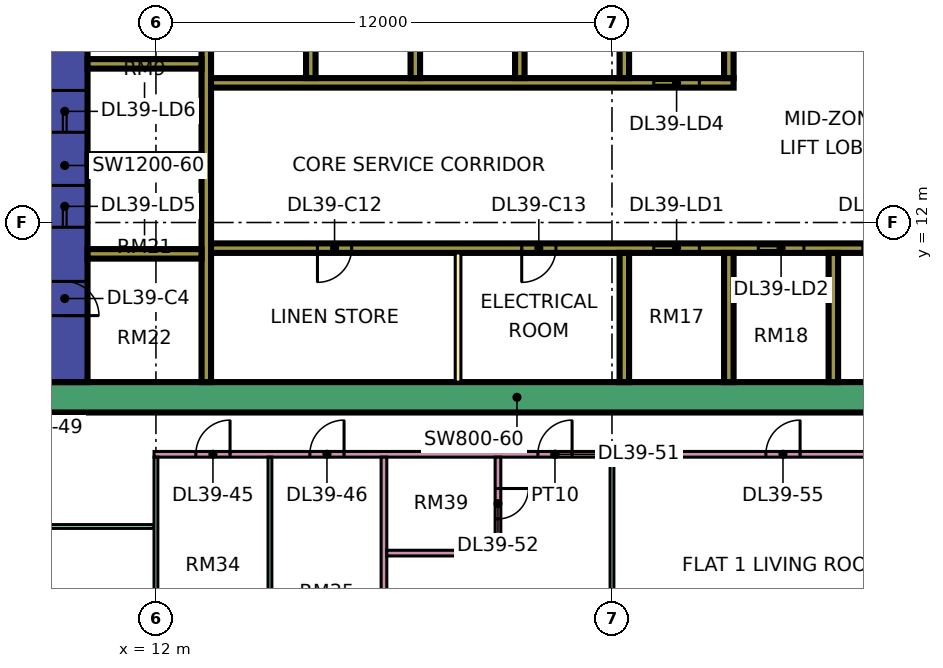
"""IFC4 building model, lengths in metres.
Left out: names, types, materials, properties, quantities, classifications, styles, units other than length and angle.
Written with IfcOpenShell. Run it as: python <this file> out.ifc"""

import sys

from ifc_helpers import new_model, si_unit, direction, frame, frame_2d, origin, place, context, subcontext, project, spatial, rectangle, extrude, element, fill, save


model = new_model("IFC4")
c1 = context("Model", 3, precision=1e-05, world=origin(), true_north=direction((0.0, 1.0)))
c2 = subcontext(c1, "Body", "Model", "MODEL_VIEW")
j1 = project(units=[si_unit("LENGTHUNIT", "METRE"), si_unit("PLANEANGLEUNIT", "RADIAN")], contexts=[c1])
p1 = place(None, origin())
s1 = spatial("IfcSite", under=j1, at=p1, CompositionType="ELEMENT")
p2 = place(p1, origin())
s2 = spatial("IfcBuilding", under=s1, at=p2, CompositionType="ELEMENT")
p3 = place(p2, frame((0.0, 0.0, 172.4)))
s3 = spatial("IfcBuildingStorey", under=s2, at=p3, CompositionType="ELEMENT", Elevation=172.4)
p4 = place(p3, frame((9.0, 7.4, 0.0), z_axis=(0.0, 0.0, 1.0), x_axis=(1.0, 0.0, 0.0)))
e1 = element("IfcWall", 1, at=p4, inside=s3, PredefinedType="SHEAR", context=c2, shape_type="SweptSolid", body=[
    extrude(rectangle(XDim=25.0, YDim=0.8, at=frame_2d((12.5, 0.0))), origin(), (0.0, 0.0, 1.0), 3.75),
])
p5 = place(p3, frame((9.6, 7.8, 0.0), z_axis=(0.0, 0.0, 1.0), x_axis=(0.0, 1.0, 0.0)))
e2 = element("IfcWall", 2, at=p5, inside=s3, PredefinedType="SHEAR", context=c2, shape_type="SweptSolid", body=[
    extrude(rectangle(XDim=11.4, YDim=1.2, at=frame_2d((5.7, 0.0))), origin(), (0.0, 0.0, 1.0), 3.75),
])
p6 = place(p5, frame((4.075, 0.0, 0.0)))
e3 = element("IfcOpeningElement", 3, at=p6, cuts=e2, PredefinedType="OPENING", context=c2, shape_type="SweptSolid", body=[
    extrude(rectangle(XDim=1.1, YDim=2.2, at=frame_2d((0.55, 1.1))), frame((0.0, 0.61, 0.0), z_axis=(0.0, -1.0, 0.0), x_axis=(1.0, 0.0, 0.0)), (0.0, 0.0, 1.0), 1.22),
])
p7 = place(p5, frame((6.575, 0.0, 0.0)))
e4 = element("IfcOpeningElement", 4, at=p7, cuts=e2, PredefinedType="OPENING", context=c2, shape_type="SweptSolid", body=[
    extrude(rectangle(XDim=1.1, YDim=2.2, at=frame_2d((0.55, 1.1))), frame((0.0, 0.61, 0.0), z_axis=(0.0, -1.0, 0.0), x_axis=(1.0, 0.0, 0.0)), (0.0, 0.0, 1.0), 1.22),
])
p8 = place(p5, frame((9.4, 0.0, 0.0)))
e5 = element("IfcOpeningElement", 5, at=p8, cuts=e2, PredefinedType="OPENING", context=c2, shape_type="SweptSolid", body=[
    extrude(rectangle(XDim=1.1, YDim=2.2, at=frame_2d((0.55, 1.1))), frame((0.0, 0.61, 0.0), z_axis=(0.0, -1.0, 0.0), x_axis=(1.0, 0.0, 0.0)), (0.0, 0.0, 1.0), 1.22),
])
p9 = place(p5, frame((1.75, 0.0, 0.0)))
e6 = element("IfcOpeningElement", 6, at=p9, cuts=e2, PredefinedType="OPENING", context=c2, shape_type="SweptSolid", body=[
    extrude(rectangle(XDim=0.9, YDim=2.1, at=frame_2d((0.45, 1.05))), frame((0.0, 0.61, 0.0), z_axis=(0.0, -1.0, 0.0), x_axis=(1.0, 0.0, 0.0)), (0.0, 0.0, 1.0), 1.22),
])
p10 = place(p3, frame((13.325, 7.8, 0.0), z_axis=(0.0, 0.0, 1.0), x_axis=(0.0, 1.0, 0.0)))
e7 = element("IfcWall", 7, at=p10, inside=s3, PredefinedType="SHEAR", context=c2, shape_type="SweptSolid", body=[
    extrude(rectangle(XDim=11.4, YDim=0.25, at=frame_2d((5.7, 0.0))), origin(), (0.0, 0.0, 1.0), 3.75),
])
p11 = place(p3, frame((13.45, 11.325, 0.0), z_axis=(0.0, 0.0, 1.0), x_axis=(1.0, 0.0, 0.0)))
e8 = element("IfcWall", 8, at=p11, inside=s3, PredefinedType="SHEAR", context=c2, shape_type="SweptSolid", body=[
    extrude(rectangle(XDim=19.75, YDim=0.25, at=frame_2d((9.875, 0.0))), origin(), (0.0, 0.0, 1.0), 3.75),
])
p12 = place(p11, frame((11.65, 0.0, 0.0)))
e9 = element("IfcOpeningElement", 9, at=p12, cuts=e8, PredefinedType="OPENING", context=c2, shape_type="SweptSolid", body=[
    extrude(rectangle(XDim=1.2, YDim=2.2, at=frame_2d((0.6, 1.1))), frame((0.0, 0.135, 0.0), z_axis=(0.0, -1.0, 0.0), x_axis=(1.0, 0.0, 0.0)), (0.0, 0.0, 1.0), 0.27),
])
p13 = place(p11, frame((14.4, 0.0, 0.0)))
e10 = element("IfcOpeningElement", 10, at=p13, cuts=e8, PredefinedType="OPENING", context=c2, shape_type="SweptSolid", body=[
    extrude(rectangle(XDim=1.2, YDim=2.2, at=frame_2d((0.6, 1.1))), frame((0.0, 0.135, 0.0), z_axis=(0.0, -1.0, 0.0), x_axis=(1.0, 0.0, 0.0)), (0.0, 0.0, 1.0), 0.27),
])
p14 = place(p11, frame((17.15, 0.0, 0.0)))
e11 = element("IfcOpeningElement", 11, at=p14, cuts=e8, PredefinedType="OPENING", context=c2, shape_type="SweptSolid", body=[
    extrude(rectangle(XDim=1.2, YDim=2.2, at=frame_2d((0.6, 1.1))), frame((0.0, 0.135, 0.0), z_axis=(0.0, -1.0, 0.0), x_axis=(1.0, 0.0, 0.0)), (0.0, 0.0, 1.0), 0.27),
])
p15 = place(p11, frame((2.8, 0.0, 0.0)))
e12 = element("IfcOpeningElement", 12, at=p15, cuts=e8, PredefinedType="OPENING", context=c2, shape_type="SweptSolid", body=[
    extrude(rectangle(XDim=0.9, YDim=2.1, at=frame_2d((0.45, 1.05))), frame((0.0, 0.135, 0.0), z_axis=(0.0, -1.0, 0.0), x_axis=(1.0, 0.0, 0.0)), (0.0, 0.0, 1.0), 0.27),
])
p16 = place(p11, frame((8.175, 0.0, 0.0)))
e13 = element("IfcOpeningElement", 13, at=p16, cuts=e8, PredefinedType="OPENING", context=c2, shape_type="SweptSolid", body=[
    extrude(rectangle(XDim=0.9, YDim=2.1, at=frame_2d((0.45, 1.05))), frame((0.0, 0.135, 0.0), z_axis=(0.0, -1.0, 0.0), x_axis=(1.0, 0.0, 0.0)), (0.0, 0.0, 1.0), 0.27),
])
p17 = place(p3, frame((13.45, 15.675, 0.0), z_axis=(0.0, 0.0, 1.0), x_axis=(1.0, 0.0, 0.0)))
e14 = element("IfcWall", 14, at=p17, inside=s3, PredefinedType="SHEAR", context=c2, shape_type="SweptSolid", body=[
    extrude(rectangle(XDim=13.75, YDim=0.25, at=frame_2d((6.875, 0.0))), origin(), (0.0, 0.0, 1.0), 3.75),
])
p18 = place(p17, frame((11.65, 0.0, 0.0)))
e15 = element("IfcOpeningElement", 15, at=p18, cuts=e14, PredefinedType="OPENING", context=c2, shape_type="SweptSolid", body=[
    extrude(rectangle(XDim=1.2, YDim=2.2, at=frame_2d((0.6, 1.1))), frame((0.0, 0.135, 0.0), z_axis=(0.0, -1.0, 0.0), x_axis=(1.0, 0.0, 0.0)), (0.0, 0.0, 1.0), 0.27),
])
for number, where, z_axis, x_axis in (
    (16, (10.2, 11.175, 0.0), (0.0, 0.0, 1.0), (1.0, 0.0, 0.0)),
    (17, (10.2, 13.675, 0.0), (0.0, 0.0, 1.0), (1.0, 0.0, 0.0)),
    (18, (10.2, 16.175, 0.0), (0.0, 0.0, 1.0), (1.0, 0.0, 0.0)),
):
    element("IfcWall", number, at=place(p3, frame(where, z_axis=z_axis, x_axis=x_axis)), inside=s3, PredefinedType="SHEAR", context=c2, shape_type="SweptSolid", body=[
        extrude(rectangle(XDim=3.0, YDim=0.25, at=frame_2d((1.5, 0.0))), origin(), (0.0, 0.0, 1.0), 3.75),
    ])
for number, where, z_axis, x_axis in (
    (19, (24.325, 7.8, 0.0), (0.0, 0.0, 1.0), (0.0, 1.0, 0.0)),
    (20, (27.075, 7.8, 0.0), (0.0, 0.0, 1.0), (0.0, 1.0, 0.0)),
    (21, (29.825, 7.8, 0.0), (0.0, 0.0, 1.0), (0.0, 1.0, 0.0)),
    (22, (16.075, 15.8, 0.0), (0.0, 0.0, 1.0), (0.0, 1.0, 0.0)),
    (23, (18.825, 15.8, 0.0), (0.0, 0.0, 1.0), (0.0, 1.0, 0.0)),
    (24, (21.575, 15.8, 0.0), (0.0, 0.0, 1.0), (0.0, 1.0, 0.0)),
    (25, (24.325, 15.8, 0.0), (0.0, 0.0, 1.0), (0.0, 1.0, 0.0)),
    (26, (27.075, 15.8, 0.0), (0.0, 0.0, 1.0), (0.0, 1.0, 0.0)),
):
    element("IfcWall", number, at=place(p3, frame(where, z_axis=z_axis, x_axis=x_axis)), inside=s3, PredefinedType="SHEAR", context=c2, shape_type="SweptSolid", body=[
        extrude(rectangle(XDim=3.4, YDim=0.25, at=frame_2d((1.7, 0.0))), origin(), (0.0, 0.0, 1.0), 3.75),
    ])
p19 = place(p3, frame((-1.447, 12.553, 0.0), z_axis=(0.0, 0.0, 1.0), x_axis=(0.707106781187, -0.707106781187, 0.0)))
e27 = element("IfcWall", 27, at=p19, inside=s3, PredefinedType="SOLIDWALL", context=c2, shape_type="SweptSolid", body=[
    extrude(rectangle(XDim=19.799, YDim=0.15, at=frame_2d((9.899, 0.0))), origin(), (0.0, 0.0, 1.0), 3.35),
])
p20 = place(p19, frame((2.212, 0.0, 0.45)))
e28 = element("IfcOpeningElement", 28, at=p20, cuts=e27, PredefinedType="OPENING", context=c2, shape_type="SweptSolid", body=[
    extrude(rectangle(XDim=3.0, YDim=2.4, at=frame_2d((1.5, 1.2))), frame((0.0, 0.085, 0.0), z_axis=(0.0, -1.0, 0.0), x_axis=(1.0, 0.0, 0.0)), (0.0, 0.0, 1.0), 0.17),
])
p21 = place(p19, frame((10.216, 0.0, 0.45)))
e29 = element("IfcOpeningElement", 29, at=p21, cuts=e27, PredefinedType="OPENING", context=c2, shape_type="SweptSolid", body=[
    extrude(rectangle(XDim=3.0, YDim=2.4, at=frame_2d((1.5, 1.2))), frame((0.0, 0.085, 0.0), z_axis=(0.0, -1.0, 0.0), x_axis=(1.0, 0.0, 0.0)), (0.0, 0.0, 1.0), 0.17),
])
p22 = place(p3, frame((19.95, 7.8, 0.0), z_axis=(0.0, 0.0, 1.0), x_axis=(0.0, 1.0, 0.0)))
e30 = element("IfcWall", 30, at=p22, inside=s3, PredefinedType="PARTITIONING", context=c2, shape_type="SweptSolid", body=[
    extrude(rectangle(XDim=3.4, YDim=0.15, at=frame_2d((1.7, 0.0))), origin(), (0.0, 0.0, 1.0), 3.35),
])
p23 = place(p3, frame((9.05, 4.0, 0.0), z_axis=(0.0, 0.0, 1.0), x_axis=(1.0, 0.0, 0.0)))
e31 = element("IfcWall", 31, at=p23, inside=s3, PredefinedType="PARTITIONING", context=c2, shape_type="SweptSolid", body=[
    extrude(rectangle(XDim=2.9, YDim=0.1, at=frame_2d((1.45, 0.0))), origin(), (0.0, 0.0, 1.0), 3.35),
])
p24 = place(p3, frame((11.95, 5.9, 0.0), z_axis=(0.0, 0.0, 1.0), x_axis=(1.0, 0.0, 0.0)))
e32 = element("IfcWall", 32, at=p24, inside=s3, PredefinedType="PARTITIONING", context=c2, shape_type="SweptSolid", body=[
    extrude(rectangle(XDim=21.1, YDim=0.15, at=frame_2d((10.55, 0.0))), origin(), (0.0, 0.0, 1.0), 3.35),
])
p25 = place(p24, frame((1.1, 0.0, 0.0)))
e33 = element("IfcOpeningElement", 33, at=p25, cuts=e32, PredefinedType="OPENING", context=c2, shape_type="SweptSolid", body=[
    extrude(rectangle(XDim=0.9, YDim=2.1, at=frame_2d((0.45, 1.05))), frame((0.0, 0.085, 0.0), z_axis=(0.0, -1.0, 0.0), x_axis=(1.0, 0.0, 0.0)), (0.0, 0.0, 1.0), 0.17),
])
p26 = place(p24, frame((4.1, 0.0, 0.0)))
e34 = element("IfcOpeningElement", 34, at=p26, cuts=e32, PredefinedType="OPENING", context=c2, shape_type="SweptSolid", body=[
    extrude(rectangle(XDim=0.9, YDim=2.1, at=frame_2d((0.45, 1.05))), frame((0.0, 0.085, 0.0), z_axis=(0.0, -1.0, 0.0), x_axis=(1.0, 0.0, 0.0)), (0.0, 0.0, 1.0), 0.17),
])
p27 = place(p24, frame((10.1, 0.0, 0.0)))
e35 = element("IfcOpeningElement", 35, at=p27, cuts=e32, PredefinedType="OPENING", context=c2, shape_type="SweptSolid", body=[
    extrude(rectangle(XDim=0.9, YDim=2.1, at=frame_2d((0.45, 1.05))), frame((0.0, 0.085, 0.0), z_axis=(0.0, -1.0, 0.0), x_axis=(1.0, 0.0, 0.0)), (0.0, 0.0, 1.0), 0.17),
])
p28 = place(p24, frame((16.1, 0.0, 0.0)))
e36 = element("IfcOpeningElement", 36, at=p28, cuts=e32, PredefinedType="OPENING", context=c2, shape_type="SweptSolid", body=[
    extrude(rectangle(XDim=0.9, YDim=2.1, at=frame_2d((0.45, 1.05))), frame((0.0, 0.085, 0.0), z_axis=(0.0, -1.0, 0.0), x_axis=(1.0, 0.0, 0.0)), (0.0, 0.0, 1.0), 0.17),
])
p29 = place(p3, frame((12.0, -0.788, 0.0), z_axis=(0.0, 0.0, 1.0), x_axis=(0.0, 1.0, 0.0)))
e37 = element("IfcWall", 37, at=p29, inside=s3, PredefinedType="PARTITIONING", context=c2, shape_type="SweptSolid", body=[
    extrude(rectangle(XDim=6.613, YDim=0.1, at=frame_2d((3.306, 0.0))), origin(), (0.0, 0.0, 1.0), 3.35),
])
p30 = place(p3, frame((15.0, -1.351, 0.0), z_axis=(0.0, 0.0, 1.0), x_axis=(0.0, 1.0, 0.0)))
e38 = element("IfcWall", 38, at=p30, inside=s3, PredefinedType="PARTITIONING", context=c2, shape_type="SweptSolid", body=[
    extrude(rectangle(XDim=7.176, YDim=0.1, at=frame_2d((3.588, 0.0))), origin(), (0.0, 0.0, 1.0), 3.35),
])
p31 = place(p3, frame((18.0, -1.351, 0.0), z_axis=(0.0, 0.0, 1.0), x_axis=(0.0, 1.0, 0.0)))
e39 = element("IfcWall", 39, at=p31, inside=s3, PredefinedType="PARTITIONING", context=c2, shape_type="SweptSolid", body=[
    extrude(rectangle(XDim=7.176, YDim=0.15, at=frame_2d((3.588, 0.0))), origin(), (0.0, 0.0, 1.0), 3.35),
])
p32 = place(p3, frame((18.075, 3.3, 0.0), z_axis=(0.0, 0.0, 1.0), x_axis=(1.0, 0.0, 0.0)))
e40 = element("IfcWall", 40, at=p32, inside=s3, PredefinedType="PARTITIONING", context=c2, shape_type="SweptSolid", body=[
    extrude(rectangle(XDim=3.0, YDim=0.15, at=frame_2d((1.5, 0.0))), origin(), (0.0, 0.0, 1.0), 3.35),
])
p33 = place(p3, frame((21.0, 3.375, 0.0), z_axis=(0.0, 0.0, 1.0), x_axis=(0.0, 1.0, 0.0)))
e41 = element("IfcWall", 41, at=p33, inside=s3, PredefinedType="PARTITIONING", context=c2, shape_type="SweptSolid", body=[
    extrude(rectangle(XDim=2.45, YDim=0.15, at=frame_2d((1.225, 0.0))), origin(), (0.0, 0.0, 1.0), 3.35),
])
p34 = place(p33, frame((0.825, 0.0, 0.0)))
e42 = element("IfcOpeningElement", 42, at=p34, cuts=e41, PredefinedType="OPENING", context=c2, shape_type="SweptSolid", body=[
    extrude(rectangle(XDim=0.8, YDim=2.1, at=frame_2d((0.4, 1.05))), frame((0.0, 0.085, 0.0), z_axis=(0.0, -1.0, 0.0), x_axis=(1.0, 0.0, 0.0)), (0.0, 0.0, 1.0), 0.17),
])
p35 = place(p3, frame((24.0, 0.0, 0.0), z_axis=(0.0, 0.0, 1.0), x_axis=(0.0, 1.0, 0.0)))
e43 = element("IfcWall", 43, at=p35, inside=s3, PredefinedType="PARTITIONING", context=c2, shape_type="SweptSolid", body=[
    extrude(rectangle(XDim=5.825, YDim=0.1, at=frame_2d((2.913, 0.0))), origin(), (0.0, 0.0, 1.0), 3.35),
])
p36 = place(p12, origin())
e44 = element("IfcDoor", 44, at=p36, inside=s3, OperationType="DOUBLE_DOOR_SLIDING", PredefinedType="DOOR", context=c2, shape_type="SweptSolid", body=[
    extrude(rectangle(XDim=1.2, YDim=2.2, at=frame_2d((0.6, 1.1))), frame((0.0, 0.025, 0.0), z_axis=(0.0, -1.0, 0.0), x_axis=(1.0, 0.0, 0.0)), (0.0, 0.0, 1.0), 0.05),
])
fill(e9, e44)
p37 = place(p13, origin())
e45 = element("IfcDoor", 45, at=p37, inside=s3, OperationType="DOUBLE_DOOR_SLIDING", PredefinedType="DOOR", context=c2, shape_type="SweptSolid", body=[
    extrude(rectangle(XDim=1.2, YDim=2.2, at=frame_2d((0.6, 1.1))), frame((0.0, 0.025, 0.0), z_axis=(0.0, -1.0, 0.0), x_axis=(1.0, 0.0, 0.0)), (0.0, 0.0, 1.0), 0.05),
])
fill(e10, e45)
p38 = place(p14, origin())
e46 = element("IfcDoor", 46, at=p38, inside=s3, OperationType="DOUBLE_DOOR_SLIDING", PredefinedType="DOOR", context=c2, shape_type="SweptSolid", body=[
    extrude(rectangle(XDim=1.2, YDim=2.2, at=frame_2d((0.6, 1.1))), frame((0.0, 0.025, 0.0), z_axis=(0.0, -1.0, 0.0), x_axis=(1.0, 0.0, 0.0)), (0.0, 0.0, 1.0), 0.05),
])
fill(e11, e46)
p39 = place(p18, origin())
e47 = element("IfcDoor", 47, at=p39, inside=s3, OperationType="DOUBLE_DOOR_SLIDING", PredefinedType="DOOR", context=c2, shape_type="SweptSolid", body=[
    extrude(rectangle(XDim=1.2, YDim=2.2, at=frame_2d((0.6, 1.1))), frame((0.0, 0.025, 0.0), z_axis=(0.0, -1.0, 0.0), x_axis=(1.0, 0.0, 0.0)), (0.0, 0.0, 1.0), 0.05),
])
fill(e15, e47)
p40 = place(p6, origin())
e48 = element("IfcDoor", 48, at=p40, inside=s3, OperationType="DOUBLE_DOOR_SLIDING", PredefinedType="DOOR", context=c2, shape_type="SweptSolid", body=[
    extrude(rectangle(XDim=1.1, YDim=2.2, at=frame_2d((0.55, 1.1))), frame((0.0, 0.025, 0.0), z_axis=(0.0, -1.0, 0.0), x_axis=(1.0, 0.0, 0.0)), (0.0, 0.0, 1.0), 0.05),
])
fill(e3, e48)
p41 = place(p7, origin())
e49 = element("IfcDoor", 49, at=p41, inside=s3, OperationType="DOUBLE_DOOR_SLIDING", PredefinedType="DOOR", context=c2, shape_type="SweptSolid", body=[
    extrude(rectangle(XDim=1.1, YDim=2.2, at=frame_2d((0.55, 1.1))), frame((0.0, 0.025, 0.0), z_axis=(0.0, -1.0, 0.0), x_axis=(1.0, 0.0, 0.0)), (0.0, 0.0, 1.0), 0.05),
])
fill(e4, e49)
p42 = place(p9, frame((0.9, 0.0, 0.0), z_axis=(0.0, 0.0, 1.0), x_axis=(-1.0, 0.0, 0.0)))
e50 = element("IfcDoor", 50, at=p42, inside=s3, OperationType="SINGLE_SWING_LEFT", PredefinedType="DOOR", context=c2, shape_type="SweptSolid", body=[
    extrude(rectangle(XDim=0.9, YDim=2.1, at=frame_2d((0.45, 1.05))), frame((0.0, 0.025, 0.0), z_axis=(0.0, -1.0, 0.0), x_axis=(1.0, 0.0, 0.0)), (0.0, 0.0, 1.0), 0.05),
])
fill(e6, e50)
p43 = place(p15, frame((0.9, 0.0, 0.0), z_axis=(0.0, 0.0, 1.0), x_axis=(-1.0, 0.0, 0.0)))
e51 = element("IfcDoor", 51, at=p43, inside=s3, OperationType="SINGLE_SWING_LEFT", PredefinedType="DOOR", context=c2, shape_type="SweptSolid", body=[
    extrude(rectangle(XDim=0.9, YDim=2.1, at=frame_2d((0.45, 1.05))), frame((0.0, 0.025, 0.0), z_axis=(0.0, -1.0, 0.0), x_axis=(1.0, 0.0, 0.0)), (0.0, 0.0, 1.0), 0.05),
])
fill(e12, e51)
p44 = place(p16, frame((0.9, 0.0, 0.0), z_axis=(0.0, 0.0, 1.0), x_axis=(-1.0, 0.0, 0.0)))
e52 = element("IfcDoor", 52, at=p44, inside=s3, OperationType="SINGLE_SWING_LEFT", PredefinedType="DOOR", context=c2, shape_type="SweptSolid", body=[
    extrude(rectangle(XDim=0.9, YDim=2.1, at=frame_2d((0.45, 1.05))), frame((0.0, 0.025, 0.0), z_axis=(0.0, -1.0, 0.0), x_axis=(1.0, 0.0, 0.0)), (0.0, 0.0, 1.0), 0.05),
])
fill(e13, e52)
p45 = place(p25, frame((0.9, 0.0, 0.0), z_axis=(0.0, 0.0, 1.0), x_axis=(-1.0, 0.0, 0.0)))
e53 = element("IfcDoor", 53, at=p45, inside=s3, OperationType="SINGLE_SWING_RIGHT", PredefinedType="DOOR", context=c2, shape_type="SweptSolid", body=[
    extrude(rectangle(XDim=0.9, YDim=2.1, at=frame_2d((0.45, 1.05))), frame((0.0, 0.025, 0.0), z_axis=(0.0, -1.0, 0.0), x_axis=(1.0, 0.0, 0.0)), (0.0, 0.0, 1.0), 0.05),
])
fill(e33, e53)
p46 = place(p26, frame((0.9, 0.0, 0.0), z_axis=(0.0, 0.0, 1.0), x_axis=(-1.0, 0.0, 0.0)))
e54 = element("IfcDoor", 54, at=p46, inside=s3, OperationType="SINGLE_SWING_RIGHT", PredefinedType="DOOR", context=c2, shape_type="SweptSolid", body=[
    extrude(rectangle(XDim=0.9, YDim=2.1, at=frame_2d((0.45, 1.05))), frame((0.0, 0.025, 0.0), z_axis=(0.0, -1.0, 0.0), x_axis=(1.0, 0.0, 0.0)), (0.0, 0.0, 1.0), 0.05),
])
fill(e34, e54)
p47 = place(p27, frame((0.9, 0.0, 0.0), z_axis=(0.0, 0.0, 1.0), x_axis=(-1.0, 0.0, 0.0)))
e55 = element("IfcDoor", 55, at=p47, inside=s3, OperationType="SINGLE_SWING_RIGHT", PredefinedType="DOOR", context=c2, shape_type="SweptSolid", body=[
    extrude(rectangle(XDim=0.9, YDim=2.1, at=frame_2d((0.45, 1.05))), frame((0.0, 0.025, 0.0), z_axis=(0.0, -1.0, 0.0), x_axis=(1.0, 0.0, 0.0)), (0.0, 0.0, 1.0), 0.05),
])
fill(e35, e55)
p48 = place(p34, origin())
e56 = element("IfcDoor", 56, at=p48, inside=s3, OperationType="SINGLE_SWING_RIGHT", PredefinedType="DOOR", context=c2, shape_type="SweptSolid", body=[
    extrude(rectangle(XDim=0.8, YDim=2.1, at=frame_2d((0.4, 1.05))), frame((0.0, 0.025, 0.0), z_axis=(0.0, -1.0, 0.0), x_axis=(1.0, 0.0, 0.0)), (0.0, 0.0, 1.0), 0.05),
])
fill(e42, e56)
p49 = place(p28, frame((0.9, 0.0, 0.0), z_axis=(0.0, 0.0, 1.0), x_axis=(-1.0, 0.0, 0.0)))
e57 = element("IfcDoor", 57, at=p49, inside=s3, OperationType="SINGLE_SWING_RIGHT", PredefinedType="DOOR", context=c2, shape_type="SweptSolid", body=[
    extrude(rectangle(XDim=0.9, YDim=2.1, at=frame_2d((0.45, 1.05))), frame((0.0, 0.025, 0.0), z_axis=(0.0, -1.0, 0.0), x_axis=(1.0, 0.0, 0.0)), (0.0, 0.0, 1.0), 0.05),
])
fill(e36, e57)
save(model, sys.argv[1])
